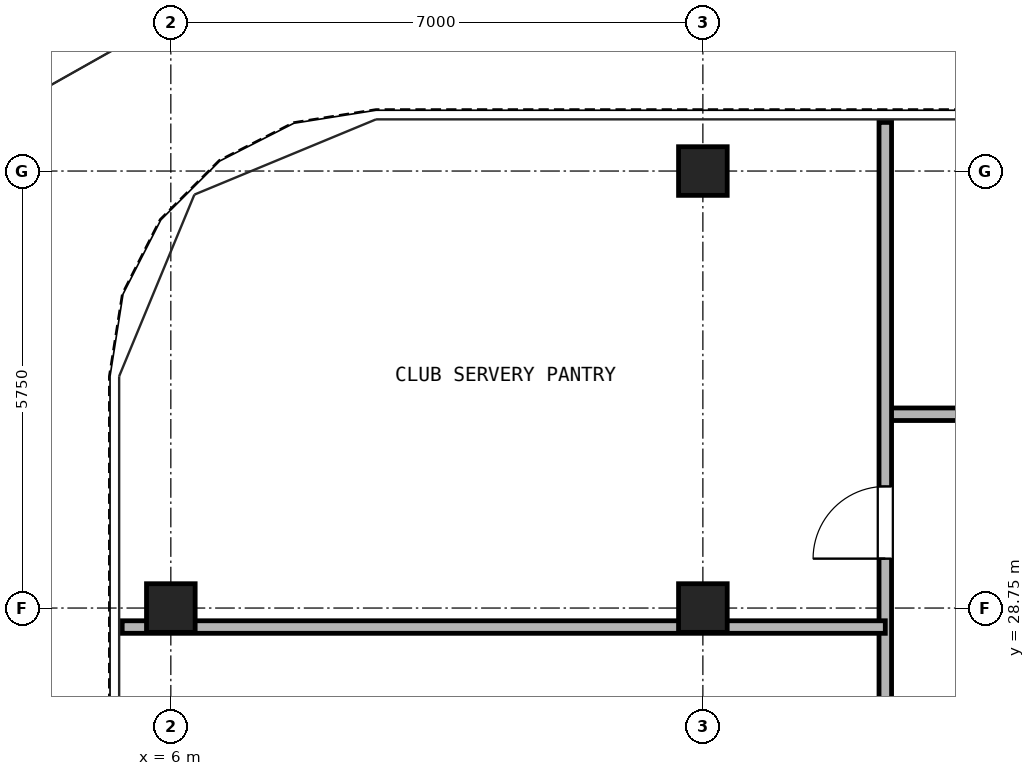
"""IFC4 building model, lengths in metres.
Left out: names, types, materials, properties, quantities, classifications, styles, units other than length and angle.
Written with IfcOpenShell. Run it as: python <this file> out.ifc"""

import sys

from ifc_helpers import new_model, si_unit, direction, frame, frame_2d, origin, origin_2d, place, context, subcontext, project, spatial, rectangle, hollow_rectangle, extrude, source, transform, mapped, element, fill, save


model = new_model("IFC4")
c1 = context("Model", 3, precision=1e-05, world=origin(), true_north=direction((0.0, 1.0)))
c2 = subcontext(c1, "Body", "Model", "MODEL_VIEW")
j1 = project(units=[si_unit("LENGTHUNIT", "METRE"), si_unit("PLANEANGLEUNIT", "RADIAN")], contexts=[c1])
p1 = place(None, origin())
s1 = spatial("IfcSite", under=j1, at=p1, CompositionType="ELEMENT")
p2 = place(p1, origin())
s2 = spatial("IfcBuilding", under=s1, at=p2, CompositionType="ELEMENT")
p3 = place(p2, frame((0.0, 0.0, 242.5)))
s3 = spatial("IfcBuildingStorey", under=s2, at=p3, CompositionType="ELEMENT", Elevation=242.5)
m1 = source(origin(), c2, "Body", "SweptSolid", [
    extrude(hollow_rectangle(XDim=0.64, YDim=0.64, WallThickness=0.035, at=origin_2d()), origin(), (0.0, 0.0, 1.0), 2.98),
])
for number, where, z_axis, x_axis in (
    (1, (13.0, 34.5, 0.0), (0.0, 0.0, 1.0), (1.0, 0.0, 0.0)),
    (2, (6.0, 28.75, 0.0), (0.0, 0.0, 1.0), (1.0, 0.0, 0.0)),
    (3, (13.0, 28.75, 0.0), (0.0, 0.0, 1.0), (1.0, 0.0, 0.0)),
):
    element("IfcColumn", number, at=place(p3, frame(where, z_axis=z_axis, x_axis=x_axis)), inside=s3, PredefinedType="COLUMN", context=c2, shape_type="MappedRepresentation", body=[
        mapped(m1, transform((0.0, 0.0, 0.0), x_axis=(1.0, 0.0, 0.0), y_axis=(0.0, 1.0, 0.0), z_axis=(0.0, 0.0, 1.0), scale=1.0)),
    ])
p4 = place(p3, frame((15.4, 31.3, 0.0), z_axis=(0.0, 0.0, 1.0), x_axis=(1.0, 0.0, 0.0)))
e4 = element("IfcWall", 4, at=p4, inside=s3, PredefinedType="PARTITIONING", context=c2, shape_type="SweptSolid", body=[
    extrude(rectangle(XDim=16.2, YDim=0.165, at=frame_2d((8.1, 0.0))), origin(), (0.0, 0.0, 1.0), 2.98),
])
p5 = place(p4, frame((2.8, 0.0, 0.0)))
e5 = element("IfcOpeningElement", 5, at=p5, cuts=e4, PredefinedType="OPENING", context=c2, shape_type="SweptSolid", body=[
    extrude(rectangle(XDim=0.95, YDim=2.15, at=frame_2d((0.475, 1.075))), frame((0.0, 0.093, 0.0), z_axis=(0.0, -1.0, 0.0), x_axis=(1.0, 0.0, 0.0)), (0.0, 0.0, 1.0), 0.185),
])
p6 = place(p4, frame((8.15, 0.0, 0.0)))
e6 = element("IfcOpeningElement", 6, at=p6, cuts=e4, PredefinedType="OPENING", context=c2, shape_type="SweptSolid", body=[
    extrude(rectangle(XDim=0.95, YDim=2.15, at=frame_2d((0.475, 1.075))), frame((0.0, 0.093, 0.0), z_axis=(0.0, -1.0, 0.0), x_axis=(1.0, 0.0, 0.0)), (0.0, 0.0, 1.0), 0.185),
])
p7 = place(p4, frame((12.95, 0.0, 0.0)))
e7 = element("IfcOpeningElement", 7, at=p7, cuts=e4, PredefinedType="OPENING", context=c2, shape_type="SweptSolid", body=[
    extrude(rectangle(XDim=0.92, YDim=2.1, at=frame_2d((0.46, 1.05))), frame((0.0, 0.093, 0.0), z_axis=(0.0, -1.0, 0.0), x_axis=(1.0, 0.0, 0.0)), (0.0, 0.0, 1.0), 0.185),
])
p8 = place(p3, frame((15.4, 10.7, 0.0), z_axis=(0.0, 0.0, 1.0), x_axis=(0.0, 1.0, 0.0)))
e8 = element("IfcWall", 8, at=p8, inside=s3, PredefinedType="PARTITIONING", context=c2, shape_type="SweptSolid", body=[
    extrude(rectangle(XDim=24.44, YDim=0.165, at=frame_2d((12.22, 0.0))), origin(), (0.0, 0.0, 1.0), 2.98),
])
p9 = place(p8, frame((4.9, 0.0, 0.0)))
e9 = element("IfcOpeningElement", 9, at=p9, cuts=e8, PredefinedType="OPENING", context=c2, shape_type="SweptSolid", body=[
    extrude(rectangle(XDim=0.95, YDim=2.15, at=frame_2d((0.475, 1.075))), frame((0.0, 0.093, 0.0), z_axis=(0.0, -1.0, 0.0), x_axis=(1.0, 0.0, 0.0)), (0.0, 0.0, 1.0), 0.185),
])
p10 = place(p8, frame((13.8, 0.0, 0.0)))
e10 = element("IfcOpeningElement", 10, at=p10, cuts=e8, PredefinedType="OPENING", context=c2, shape_type="SweptSolid", body=[
    extrude(rectangle(XDim=0.95, YDim=2.15, at=frame_2d((0.475, 1.075))), frame((0.0, 0.093, 0.0), z_axis=(0.0, -1.0, 0.0), x_axis=(1.0, 0.0, 0.0)), (0.0, 0.0, 1.0), 0.185),
])
p11 = place(p8, frame((18.7, 0.0, 0.0)))
e11 = element("IfcOpeningElement", 11, at=p11, cuts=e8, PredefinedType="OPENING", context=c2, shape_type="SweptSolid", body=[
    extrude(rectangle(XDim=0.95, YDim=2.15, at=frame_2d((0.475, 1.075))), frame((0.0, 0.093, 0.0), z_axis=(0.0, -1.0, 0.0), x_axis=(1.0, 0.0, 0.0)), (0.0, 0.0, 1.0), 0.185),
])
p12 = place(p3, frame((5.36, 28.5, 0.0), z_axis=(0.0, 0.0, 1.0), x_axis=(1.0, 0.0, 0.0)))
e12 = element("IfcWall", 12, at=p12, inside=s3, PredefinedType="PARTITIONING", context=c2, shape_type="SweptSolid", body=[
    extrude(rectangle(XDim=10.04, YDim=0.165, at=frame_2d((5.02, 0.0))), origin(), (0.0, 0.0, 1.0), 2.428),
])
p13 = place(p11, frame((0.95, 0.0, 0.0), z_axis=(0.0, 0.0, 1.0), x_axis=(-1.0, 0.0, 0.0)))
e13 = element("IfcDoor", 13, at=p13, inside=s3, OperationType="SINGLE_SWING_LEFT", PredefinedType="DOOR", context=c2, shape_type="SweptSolid", body=[
    extrude(rectangle(XDim=0.95, YDim=2.15, at=frame_2d((0.475, 1.075))), frame((0.0, 0.025, 0.0), z_axis=(0.0, -1.0, 0.0), x_axis=(1.0, 0.0, 0.0)), (0.0, 0.0, 1.0), 0.05),
])
fill(e11, e13)
save(model, sys.argv[1])
